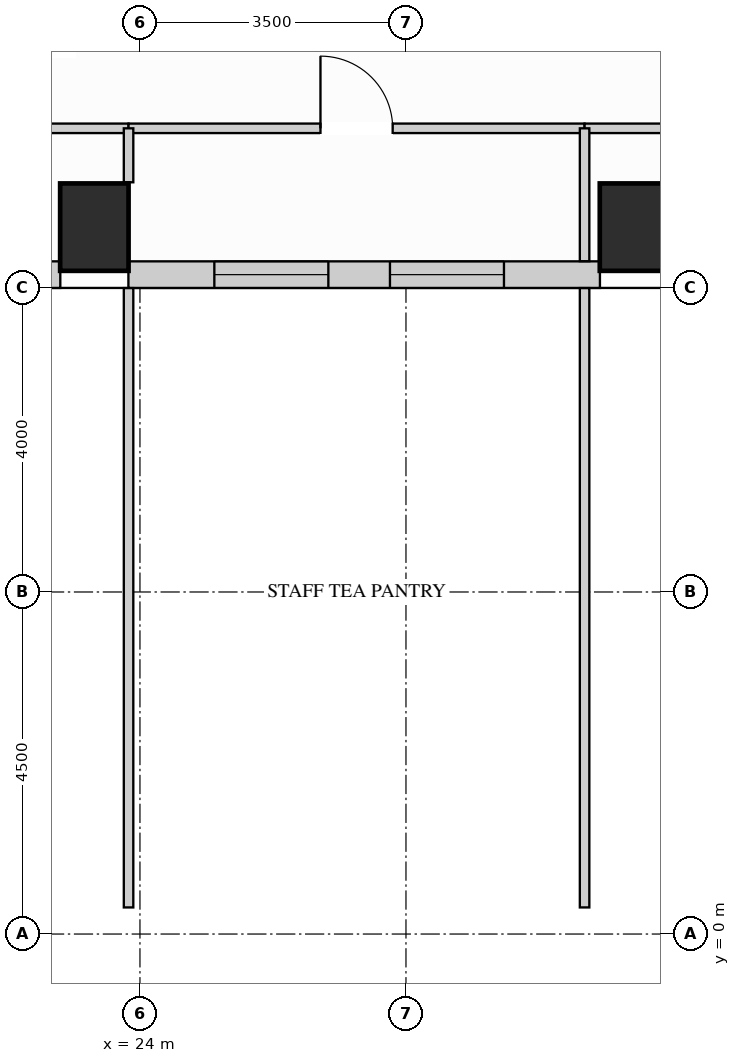
"""IFC4 building model, lengths in metres.
Left out: names, types, materials, properties, quantities, classifications, styles, units other than length and angle.
Written with IfcOpenShell. Run it as: python <this file> out.ifc"""

import sys

from ifc_helpers import new_model, si_unit, direction, frame, frame_2d, origin, origin_2d, place, context, subcontext, project, spatial, rectangle, extrude, source, transform, mapped, element, fill, save


model = new_model("IFC4")
c1 = context("Model", 3, precision=1e-05, world=origin(), true_north=direction((0.0, 1.0)))
c2 = subcontext(c1, "Body", "Model", "MODEL_VIEW")
j1 = project(units=[si_unit("LENGTHUNIT", "METRE"), si_unit("PLANEANGLEUNIT", "RADIAN")], contexts=[c1])
p1 = place(None, origin())
s1 = spatial("IfcSite", under=j1, at=p1, CompositionType="ELEMENT")
p2 = place(p1, origin())
s2 = spatial("IfcBuilding", under=s1, at=p2, CompositionType="ELEMENT")
p3 = place(p2, frame((0.0, 0.0, 95.4)))
s3 = spatial("IfcBuildingStorey", under=s2, at=p3, CompositionType="ELEMENT", Elevation=95.4)
m1 = source(origin(), c2, "Body", "SweptSolid", [
    extrude(rectangle(XDim=0.9, YDim=1.15, at=origin_2d()), origin(), (0.0, 0.0, 1.0), 3.38),
])
for number, where, z_axis, x_axis in (
    (1, (23.4, 9.3, 0.0), (0.0, 0.0, 1.0), (1.0, 0.0, 0.0)),
    (2, (30.5, 9.3, 0.0), (0.0, 0.0, 1.0), (1.0, 0.0, 0.0)),
):
    element("IfcColumn", number, at=place(p3, frame(where, z_axis=z_axis, x_axis=x_axis)), inside=s3, PredefinedType="COLUMN", context=c2, shape_type="MappedRepresentation", body=[
        mapped(m1, transform((0.0, 0.0, 0.0), x_axis=(1.0, 0.0, 0.0), y_axis=(0.0, 1.0, 0.0), z_axis=(0.0, 0.0, 1.0))),
    ])
p4 = place(p3, frame((19.448, 8.675, 0.0), z_axis=(0.0, 0.0, 1.0), x_axis=(1.0, 0.0, 0.0)))
e3 = element("IfcWall", 3, at=p4, inside=s3, PredefinedType="SOLIDWALL", context=c2, shape_type="SweptSolid", body=[
    extrude(rectangle(XDim=3.504, YDim=0.35, at=frame_2d((1.752, 0.0))), origin(), (0.0, 0.0, 1.0), 3.365),
])
p5 = place(p4, frame((1.002, 0.0, 0.78)))
e4 = element("IfcOpeningElement", 4, at=p5, cuts=e3, PredefinedType="OPENING", context=c2, shape_type="SweptSolid", body=[
    extrude(rectangle(XDim=1.5, YDim=2.0, at=frame_2d((0.75, 1.0))), frame((0.0, 0.185, 0.0), z_axis=(0.0, -1.0, 0.0), x_axis=(1.0, 0.0, 0.0)), (0.0, 0.0, 1.0), 0.37),
])
p6 = place(p3, frame((23.848, 8.675, 0.0), z_axis=(0.0, 0.0, 1.0), x_axis=(1.0, 0.0, 0.0)))
e5 = element("IfcWall", 5, at=p6, inside=s3, PredefinedType="SOLIDWALL", context=c2, shape_type="SweptSolid", body=[
    extrude(rectangle(XDim=6.204, YDim=0.35, at=frame_2d((3.102, 0.0))), origin(), (0.0, 0.0, 1.0), 3.365),
])
p7 = place(p6, frame((1.131, 0.0, 0.78)))
e6 = element("IfcOpeningElement", 6, at=p7, cuts=e5, PredefinedType="OPENING", context=c2, shape_type="SweptSolid", body=[
    extrude(rectangle(XDim=1.5, YDim=2.0, at=frame_2d((0.75, 1.0))), frame((0.0, 0.185, 0.0), z_axis=(0.0, -1.0, 0.0), x_axis=(1.0, 0.0, 0.0)), (0.0, 0.0, 1.0), 0.37),
])
p8 = place(p6, frame((3.441, 0.0, 0.78)))
e7 = element("IfcOpeningElement", 7, at=p8, cuts=e5, PredefinedType="OPENING", context=c2, shape_type="SweptSolid", body=[
    extrude(rectangle(XDim=1.5, YDim=2.0, at=frame_2d((0.75, 1.0))), frame((0.0, 0.185, 0.0), z_axis=(0.0, -1.0, 0.0), x_axis=(1.0, 0.0, 0.0)), (0.0, 0.0, 1.0), 0.37),
])
p9 = place(p3, frame((19.5, 10.6, 0.0), z_axis=(0.0, 0.0, 1.0), x_axis=(1.0, 0.0, 0.0)))
e8 = element("IfcWall", 8, at=p9, inside=s3, PredefinedType="PARTITIONING", context=c2, shape_type="SweptSolid", body=[
    extrude(rectangle(XDim=4.35, YDim=0.125, at=frame_2d((2.175, 0.0))), origin(), (0.0, 0.0, 1.0), 3.365),
])
p10 = place(p9, frame((1.7, 0.0, 0.0)))
e9 = element("IfcOpeningElement", 9, at=p10, cuts=e8, PredefinedType="OPENING", context=c2, shape_type="SweptSolid", body=[
    extrude(rectangle(XDim=0.95, YDim=2.15, at=frame_2d((0.475, 1.075))), frame((0.0, 0.073, 0.0), z_axis=(0.0, -1.0, 0.0), x_axis=(1.0, 0.0, 0.0)), (0.0, 0.0, 1.0), 0.145),
])
p11 = place(p3, frame((23.85, 10.6, 0.0), z_axis=(0.0, 0.0, 1.0), x_axis=(1.0, 0.0, 0.0)))
e10 = element("IfcWall", 10, at=p11, inside=s3, PredefinedType="PARTITIONING", context=c2, shape_type="SweptSolid", body=[
    extrude(rectangle(XDim=6.0, YDim=0.125, at=frame_2d((3.0, 0.0))), origin(), (0.0, 0.0, 1.0), 3.365),
])
p12 = place(p11, frame((2.525, 0.0, 0.0)))
e11 = element("IfcOpeningElement", 11, at=p12, cuts=e10, PredefinedType="OPENING", context=c2, shape_type="SweptSolid", body=[
    extrude(rectangle(XDim=0.95, YDim=2.15, at=frame_2d((0.475, 1.075))), frame((0.0, 0.073, 0.0), z_axis=(0.0, -1.0, 0.0), x_axis=(1.0, 0.0, 0.0)), (0.0, 0.0, 1.0), 0.145),
])
p13 = place(p3, frame((29.85, 10.6, 0.0), z_axis=(0.0, 0.0, 1.0), x_axis=(1.0, 0.0, 0.0)))
e12 = element("IfcWall", 12, at=p13, inside=s3, PredefinedType="PARTITIONING", context=c2, shape_type="SweptSolid", body=[
    extrude(rectangle(XDim=4.55, YDim=0.125, at=frame_2d((2.275, 0.0))), origin(), (0.0, 0.0, 1.0), 3.365),
])
p14 = place(p13, frame((1.8, 0.0, 0.0)))
e13 = element("IfcOpeningElement", 13, at=p14, cuts=e12, PredefinedType="OPENING", context=c2, shape_type="SweptSolid", body=[
    extrude(rectangle(XDim=0.95, YDim=2.15, at=frame_2d((0.475, 1.075))), frame((0.0, 0.073, 0.0), z_axis=(0.0, -1.0, 0.0), x_axis=(1.0, 0.0, 0.0)), (0.0, 0.0, 1.0), 0.145),
])
m2 = source(origin(), c2, "Body", "SweptSolid", [
    extrude(rectangle(XDim=8.148, YDim=0.125, at=frame_2d((4.074, 0.0))), origin(), (0.0, 0.0, 1.0), 3.365),
])
p15 = place(p3, frame((23.85, 0.35, 0.0), z_axis=(0.0, 0.0, 1.0), x_axis=(0.0, 1.0, 0.0)))
e14 = element("IfcWall", 14, at=p15, inside=s3, PredefinedType="PARTITIONING", context=c2, shape_type="MappedRepresentation", body=[
    mapped(m2, transform((0.0, 0.0, 0.0), x_axis=(1.0, 0.0, 0.0), y_axis=(0.0, 1.0, 0.0), z_axis=(0.0, 0.0, 1.0))),
])
m3 = source(origin(), c2, "Body", "SweptSolid", [
    extrude(rectangle(XDim=0.71, YDim=0.125, at=frame_2d((0.355, 0.0))), origin(), (0.0, 0.0, 1.0), 3.365),
])
p16 = place(p3, frame((23.85, 9.89, 0.0), z_axis=(0.0, 0.0, 1.0), x_axis=(0.0, 1.0, 0.0)))
e15 = element("IfcWall", 15, at=p16, inside=s3, PredefinedType="PARTITIONING", context=c2, shape_type="MappedRepresentation", body=[
    mapped(m3, transform((0.0, 0.0, 0.0), x_axis=(1.0, 0.0, 0.0), y_axis=(0.0, 1.0, 0.0), z_axis=(0.0, 0.0, 1.0))),
])
p17 = place(p3, frame((29.85, 0.35, 0.0), z_axis=(0.0, 0.0, 1.0), x_axis=(0.0, 1.0, 0.0)))
e16 = element("IfcWall", 16, at=p17, inside=s3, PredefinedType="PARTITIONING", context=c2, shape_type="MappedRepresentation", body=[
    mapped(m2, transform((0.0, 0.0, 0.0), x_axis=(1.0, 0.0, 0.0), y_axis=(0.0, 1.0, 0.0), z_axis=(0.0, 0.0, 1.0))),
])
m4 = source(origin(), c2, "Body", "SweptSolid", [
    extrude(rectangle(XDim=1.748, YDim=0.125, at=frame_2d((0.874, 0.0))), origin(), (0.0, 0.0, 1.0), 3.365),
])
p18 = place(p3, frame((29.85, 8.852, 0.0), z_axis=(0.0, 0.0, 1.0), x_axis=(0.0, 1.0, 0.0)))
e17 = element("IfcWall", 17, at=p18, inside=s3, PredefinedType="PARTITIONING", context=c2, shape_type="MappedRepresentation", body=[
    mapped(m4, transform((0.0, 0.0, 0.0), x_axis=(1.0, 0.0, 0.0), y_axis=(0.0, 1.0, 0.0), z_axis=(0.0, 0.0, 1.0))),
])
m5 = source(origin(), c2, "Body", "SweptSolid", [
    extrude(rectangle(XDim=0.95, YDim=2.15, at=frame_2d((0.475, 1.075))), frame((0.0, 0.025, 0.0), z_axis=(0.0, -1.0, 0.0), x_axis=(1.0, 0.0, 0.0)), (0.0, 0.0, 1.0), 0.05),
])
p19 = place(p12, origin())
e18 = element("IfcDoor", 18, at=p19, inside=s3, OperationType="SINGLE_SWING_LEFT", PredefinedType="DOOR", context=c2, shape_type="MappedRepresentation", body=[
    mapped(m5, transform((0.0, 0.0, 0.0), x_axis=(1.0, 0.0, 0.0), y_axis=(0.0, 1.0, 0.0), z_axis=(0.0, 0.0, 1.0))),
])
fill(e11, e18)
m6 = source(origin(), c2, "Body", "SweptSolid", [
    extrude(rectangle(XDim=1.5, YDim=2.0, at=frame_2d((0.75, 1.0))), frame((0.0, 0.03, 0.0), z_axis=(0.0, -1.0, 0.0), x_axis=(1.0, 0.0, 0.0)), (0.0, 0.0, 1.0), 0.06),
])
p20 = place(p7, origin())
e19 = element("IfcWindow", 19, at=p20, inside=s3, PartitioningType="SINGLE_PANEL", PredefinedType="WINDOW", context=c2, shape_type="MappedRepresentation", body=[
    mapped(m6, transform((0.0, 0.0, 0.0), x_axis=(1.0, 0.0, 0.0), y_axis=(0.0, 1.0, 0.0), z_axis=(0.0, 0.0, 1.0))),
])
fill(e6, e19)
p21 = place(p8, origin())
e20 = element("IfcWindow", 20, at=p21, inside=s3, PartitioningType="SINGLE_PANEL", PredefinedType="WINDOW", context=c2, shape_type="MappedRepresentation", body=[
    mapped(m6, transform((0.0, 0.0, 0.0), x_axis=(1.0, 0.0, 0.0), y_axis=(0.0, 1.0, 0.0), z_axis=(0.0, 0.0, 1.0))),
])
fill(e7, e20)
save(model, sys.argv[1])
